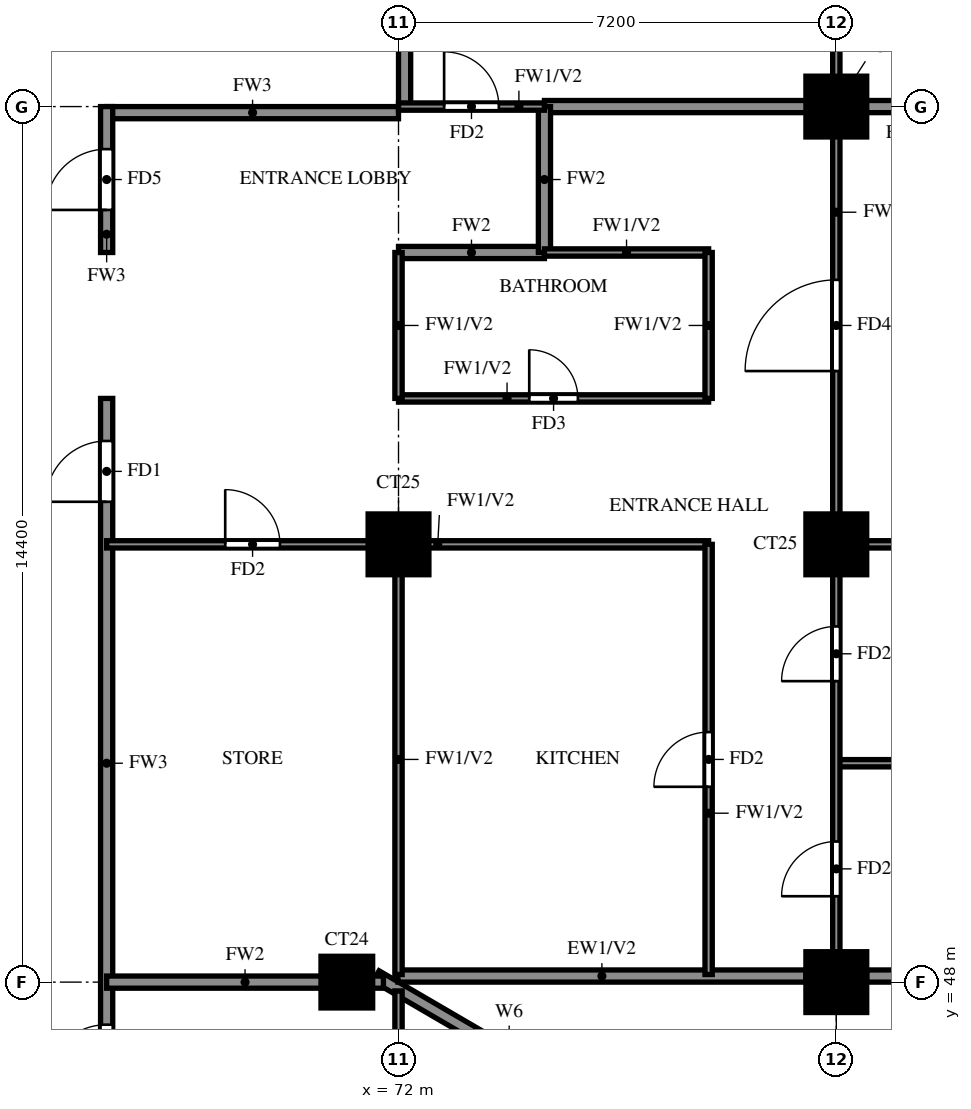
"""IFC4 building model, lengths in metres.
Left out: names, types, materials, properties, quantities, classifications, styles, units other than length and angle.
Written with IfcOpenShell. Run it as: python <this file> out.ifc"""

import sys

from ifc_helpers import new_model, si_unit, direction, frame, frame_2d, origin, origin_2d, place, context, subcontext, project, spatial, rectangle, extrude, source, transform, mapped, element, fill, save


model = new_model("IFC4")
c1 = context("Model", 3, precision=1e-05, world=origin(), true_north=direction((0.0, 1.0)))
c2 = subcontext(c1, "Body", "Model", "MODEL_VIEW")
j1 = project(units=[si_unit("LENGTHUNIT", "METRE"), si_unit("PLANEANGLEUNIT", "RADIAN")], contexts=[c1])
p1 = place(None, origin())
s1 = spatial("IfcSite", under=j1, at=p1, CompositionType="ELEMENT")
p2 = place(p1, origin())
s2 = spatial("IfcBuilding", under=s1, at=p2, CompositionType="ELEMENT")
p3 = place(p2, frame((0.0, 0.0, 157.0)))
s3 = spatial("IfcBuildingStorey", under=s2, at=p3, CompositionType="ELEMENT", Elevation=157.0)
m1 = source(origin(), c2, "Body", "SweptSolid", [
    extrude(rectangle(XDim=0.85, YDim=0.85, at=origin_2d()), origin(), (0.0, 0.0, 1.0), 3.2),
])
p4 = place(p3, frame((71.15, 48.0, 0.0), z_axis=(0.0, 0.0, 1.0), x_axis=(1.0, 0.0, 0.0)))
e1 = element("IfcColumn", 1, at=p4, inside=s3, PredefinedType="COLUMN", context=c2, shape_type="MappedRepresentation", body=[
    mapped(m1, transform((0.0, 0.0, 0.0))),
])
m2 = source(origin(), c2, "Body", "SweptSolid", [
    extrude(rectangle(XDim=1.0, YDim=1.0, at=origin_2d()), origin(), (0.0, 0.0, 1.0), 3.2),
])
for number, where, z_axis, x_axis in (
    (2, (79.2, 48.0, 0.0), (0.0, 0.0, 1.0), (1.0, 0.0, 0.0)),
    (3, (72.0, 55.2, 0.0), (0.0, 0.0, 1.0), (1.0, 0.0, 0.0)),
    (4, (79.2, 55.2, 0.0), (0.0, 0.0, 1.0), (1.0, 0.0, 0.0)),
    (5, (79.2, 62.4, 0.0), (0.0, 0.0, 1.0), (1.0, 0.0, 0.0)),
):
    element("IfcColumn", number, at=place(p3, frame(where, z_axis=z_axis, x_axis=x_axis)), inside=s3, PredefinedType="COLUMN", context=c2, shape_type="MappedRepresentation", body=[
        mapped(m2, transform((0.0, 0.0, 0.0))),
    ])
p5 = place(p3, frame((85.719, 39.881, 0.0), z_axis=(0.0, 0.0, 1.0), x_axis=(-0.86377618652, 0.503875678716, 0.0)))
e6 = element("IfcWall", 6, at=p5, inside=s3, PredefinedType="SOLIDWALL", context=c2, shape_type="SweptSolid", body=[
    extrude(rectangle(XDim=16.311, YDim=0.2, at=frame_2d((8.156, 0.0))), origin(), (0.0, 0.0, 1.0), 3.2),
])
p6 = place(p5, frame((13.326, 0.0, 1.5)))
e7 = element("IfcOpeningElement", 7, at=p6, cuts=e6, PredefinedType="OPENING", context=c2, shape_type="SweptSolid", body=[
    extrude(rectangle(XDim=0.9, YDim=0.9, at=frame_2d((0.45, 0.45))), frame((0.0, 0.11, 0.0), z_axis=(0.0, -1.0, 0.0), x_axis=(1.0, 0.0, 0.0)), (0.0, 0.0, 1.0), 0.22),
])
p7 = place(p3, frame((71.99, 48.1, 0.0), z_axis=(0.0, 0.0, 1.0), x_axis=(1.0, 0.0, 0.0)))
e8 = element("IfcWall", 8, at=p7, inside=s3, PredefinedType="SOLIDWALL", context=c2, shape_type="SweptSolid", body=[
    extrude(rectangle(XDim=6.71, YDim=0.2, at=frame_2d((3.355, 0.0))), origin(), (0.0, 0.0, 1.0), 3.2),
])
p8 = place(p3, frame((79.7, 48.1, 0.0), z_axis=(0.0, 0.0, 1.0), x_axis=(1.0, 0.0, 0.0)))
e9 = element("IfcWall", 9, at=p8, inside=s3, PredefinedType="SOLIDWALL", context=c2, shape_type="SweptSolid", body=[
    extrude(rectangle(XDim=5.675, YDim=0.2, at=frame_2d((2.837, 0.0))), origin(), (0.0, 0.0, 1.0), 3.2),
])
p9 = place(p8, frame((1.637, 0.0, 0.6)))
e10 = element("IfcOpeningElement", 10, at=p9, cuts=e9, PredefinedType="OPENING", context=c2, shape_type="SweptSolid", body=[
    extrude(rectangle(XDim=2.4, YDim=2.4, at=frame_2d((1.2, 1.2))), frame((0.0, 0.11, 0.0), z_axis=(0.0, -1.0, 0.0), x_axis=(1.0, 0.0, 0.0)), (0.0, 0.0, 1.0), 0.22),
])
p10 = place(p3, frame((67.2, 62.3, 0.0), z_axis=(0.0, 0.0, 1.0), x_axis=(1.0, 0.0, 0.0)))
e11 = element("IfcWall", 11, at=p10, inside=s3, PredefinedType="SOLIDWALL", context=c2, shape_type="SweptSolid", body=[
    extrude(rectangle(XDim=4.8, YDim=0.2, at=frame_2d((2.4, 0.0))), origin(), (0.0, 0.0, 1.0), 3.2),
])
p11 = place(p3, frame((67.2, 45.6, 0.0), z_axis=(0.0, 0.0, 1.0), x_axis=(0.0, 1.0, 0.0)))
e12 = element("IfcWall", 12, at=p11, inside=s3, PredefinedType="SOLIDWALL", context=c2, shape_type="SweptSolid", body=[
    extrude(rectangle(XDim=12.0, YDim=0.2, at=frame_2d((6.0, 0.0))), origin(), (0.0, 0.0, 1.0), 3.2),
])
p12 = place(p11, frame((10.3, 0.0, 0.0)))
e13 = element("IfcOpeningElement", 13, at=p12, cuts=e12, PredefinedType="OPENING", context=c2, shape_type="SweptSolid", body=[
    extrude(rectangle(XDim=1.0, YDim=2.1, at=frame_2d((0.5, 1.05))), frame((0.0, 0.11, 0.0), z_axis=(0.0, -1.0, 0.0), x_axis=(1.0, 0.0, 0.0)), (0.0, 0.0, 1.0), 0.22),
])
p13 = place(p11, frame((0.7, 0.0, 0.0)))
e14 = element("IfcOpeningElement", 14, at=p13, cuts=e12, PredefinedType="OPENING", context=c2, shape_type="SweptSolid", body=[
    extrude(rectangle(XDim=1.0, YDim=2.1, at=frame_2d((0.5, 1.05))), frame((0.0, 0.11, 0.0), z_axis=(0.0, -1.0, 0.0), x_axis=(1.0, 0.0, 0.0)), (0.0, 0.0, 1.0), 0.22),
])
p14 = place(p3, frame((67.2, 60.0, 0.0), z_axis=(0.0, 0.0, 1.0), x_axis=(0.0, 1.0, 0.0)))
e15 = element("IfcWall", 15, at=p14, inside=s3, PredefinedType="SOLIDWALL", context=c2, shape_type="SweptSolid", body=[
    extrude(rectangle(XDim=2.4, YDim=0.2, at=frame_2d((1.2, 0.0))), origin(), (0.0, 0.0, 1.0), 3.2),
])
p15 = place(p14, frame((0.7, 0.0, 0.0)))
e16 = element("IfcOpeningElement", 16, at=p15, cuts=e15, PredefinedType="OPENING", context=c2, shape_type="SweptSolid", body=[
    extrude(rectangle(XDim=1.0, YDim=2.1, at=frame_2d((0.5, 1.05))), frame((0.0, 0.11, 0.0), z_axis=(0.0, -1.0, 0.0), x_axis=(1.0, 0.0, 0.0)), (0.0, 0.0, 1.0), 0.22),
])
p16 = place(p3, frame((72.1, 62.4, 0.0), z_axis=(0.0, 0.0, 1.0), x_axis=(0.0, 1.0, 0.0)))
e17 = element("IfcWall", 17, at=p16, inside=s3, PredefinedType="SOLIDWALL", context=c2, shape_type="SweptSolid", body=[
    extrude(rectangle(XDim=15.6, YDim=0.2, at=frame_2d((7.8, 0.0))), origin(), (0.0, 0.0, 1.0), 3.2),
])
p17 = place(p3, frame((67.2, 48.0, 0.0), z_axis=(0.0, 0.0, 1.0), x_axis=(1.0, 0.0, 0.0)))
e18 = element("IfcWall", 18, at=p17, inside=s3, PredefinedType="SOLIDWALL", context=c2, shape_type="SweptSolid", body=[
    extrude(rectangle(XDim=4.552, YDim=0.2, at=frame_2d((2.276, 0.0))), origin(), (0.0, 0.0, 1.0), 3.2),
])
p18 = place(p3, frame((72.0, 60.0, 0.0), z_axis=(0.0, 0.0, 1.0), x_axis=(1.0, 0.0, 0.0)))
e19 = element("IfcWall", 19, at=p18, inside=s3, PredefinedType="SOLIDWALL", context=c2, shape_type="SweptSolid", body=[
    extrude(rectangle(XDim=2.4, YDim=0.2, at=frame_2d((1.2, 0.0))), origin(), (0.0, 0.0, 1.0), 3.2),
])
p19 = place(p3, frame((74.4, 62.4, 0.0), z_axis=(0.0, 0.0, 1.0), x_axis=(1.0, 0.0, 0.0)))
e20 = element("IfcWall", 20, at=p19, inside=s3, PredefinedType="SOLIDWALL", context=c2, shape_type="SweptSolid", body=[
    extrude(rectangle(XDim=11.875, YDim=0.2, at=frame_2d((5.938, 0.0))), origin(), (0.0, 0.0, 1.0), 3.2),
])
p20 = place(p3, frame((74.4, 60.0, 0.0), z_axis=(0.0, 0.0, 1.0), x_axis=(0.0, 1.0, 0.0)))
e21 = element("IfcWall", 21, at=p20, inside=s3, PredefinedType="SOLIDWALL", context=c2, shape_type="SweptSolid", body=[
    extrude(rectangle(XDim=2.4, YDim=0.2, at=frame_2d((1.2, 0.0))), origin(), (0.0, 0.0, 1.0), 3.2),
])
p21 = place(p3, frame((79.2, 51.6, 0.0), z_axis=(0.0, 0.0, 1.0), x_axis=(1.0, 0.0, 0.0)))
e22 = element("IfcWall", 22, at=p21, inside=s3, PredefinedType="PARTITIONING", context=c2, shape_type="SweptSolid", body=[
    extrude(rectangle(XDim=7.075, YDim=0.12, at=frame_2d((3.538, 0.0))), origin(), (0.0, 0.0, 1.0), 2.3),
])
p22 = place(p3, frame((67.2, 55.2, 0.0), z_axis=(0.0, 0.0, 1.0), x_axis=(1.0, 0.0, 0.0)))
e23 = element("IfcWall", 23, at=p22, inside=s3, PredefinedType="PARTITIONING", context=c2, shape_type="SweptSolid", body=[
    extrude(rectangle(XDim=9.9, YDim=0.12, at=frame_2d((4.95, 0.0))), origin(), (0.0, 0.0, 1.0), 3.2),
])
p23 = place(p22, frame((1.95, 0.0, 0.0)))
e24 = element("IfcOpeningElement", 24, at=p23, cuts=e23, PredefinedType="OPENING", context=c2, shape_type="SweptSolid", body=[
    extrude(rectangle(XDim=0.9, YDim=2.1, at=frame_2d((0.45, 1.05))), frame((0.0, 0.07, 0.0), z_axis=(0.0, -1.0, 0.0), x_axis=(1.0, 0.0, 0.0)), (0.0, 0.0, 1.0), 0.14),
])
p24 = place(p3, frame((79.2, 55.2, 0.0), z_axis=(0.0, 0.0, 1.0), x_axis=(1.0, 0.0, 0.0)))
e25 = element("IfcWall", 25, at=p24, inside=s3, PredefinedType="PARTITIONING", context=c2, shape_type="SweptSolid", body=[
    extrude(rectangle(XDim=7.075, YDim=0.12, at=frame_2d((3.538, 0.0))), origin(), (0.0, 0.0, 1.0), 3.2),
])
p25 = place(p3, frame((72.0, 57.6, 0.0), z_axis=(0.0, 0.0, 1.0), x_axis=(1.0, 0.0, 0.0)))
e26 = element("IfcWall", 26, at=p25, inside=s3, PredefinedType="PARTITIONING", context=c2, shape_type="SweptSolid", body=[
    extrude(rectangle(XDim=5.1, YDim=0.12, at=frame_2d((2.55, 0.0))), origin(), (0.0, 0.0, 1.0), 3.2),
])
p26 = place(p25, frame((2.15, 0.0, 0.0)))
e27 = element("IfcOpeningElement", 27, at=p26, cuts=e26, PredefinedType="OPENING", context=c2, shape_type="SweptSolid", body=[
    extrude(rectangle(XDim=0.8, YDim=2.1, at=frame_2d((0.4, 1.05))), frame((0.0, 0.07, 0.0), z_axis=(0.0, -1.0, 0.0), x_axis=(1.0, 0.0, 0.0)), (0.0, 0.0, 1.0), 0.14),
])
p27 = place(p3, frame((74.4, 60.0, 0.0), z_axis=(0.0, 0.0, 1.0), x_axis=(1.0, 0.0, 0.0)))
e28 = element("IfcWall", 28, at=p27, inside=s3, PredefinedType="PARTITIONING", context=c2, shape_type="SweptSolid", body=[
    extrude(rectangle(XDim=2.7, YDim=0.12, at=frame_2d((1.35, 0.0))), origin(), (0.0, 0.0, 1.0), 3.2),
])
p28 = place(p3, frame((72.0, 62.4, 0.0), z_axis=(0.0, 0.0, 1.0), x_axis=(1.0, 0.0, 0.0)))
e29 = element("IfcWall", 29, at=p28, inside=s3, PredefinedType="PARTITIONING", context=c2, shape_type="SweptSolid", body=[
    extrude(rectangle(XDim=2.4, YDim=0.12, at=frame_2d((1.2, 0.0))), origin(), (0.0, 0.0, 1.0), 3.2),
])
p29 = place(p28, frame((0.75, 0.0, 0.0)))
e30 = element("IfcOpeningElement", 30, at=p29, cuts=e29, PredefinedType="OPENING", context=c2, shape_type="SweptSolid", body=[
    extrude(rectangle(XDim=0.9, YDim=2.1, at=frame_2d((0.45, 1.05))), frame((0.0, 0.07, 0.0), z_axis=(0.0, -1.0, 0.0), x_axis=(1.0, 0.0, 0.0)), (0.0, 0.0, 1.0), 0.14),
])
p30 = place(p3, frame((72.0, 39.725, 0.0), z_axis=(0.0, 0.0, 1.0), x_axis=(0.0, 1.0, 0.0)))
e31 = element("IfcWall", 31, at=p30, inside=s3, PredefinedType="PARTITIONING", context=c2, shape_type="SweptSolid", body=[
    extrude(rectangle(XDim=8.13, YDim=0.12, at=frame_2d((4.065, 0.0))), origin(), (0.0, 0.0, 1.0), 2.3),
])
p31 = place(p30, frame((1.788, 0.0, 0.0)))
e32 = element("IfcOpeningElement", 32, at=p31, cuts=e31, PredefinedType="OPENING", context=c2, shape_type="SweptSolid", body=[
    extrude(rectangle(XDim=0.9, YDim=2.1, at=frame_2d((0.45, 1.05))), frame((0.0, 0.07, 0.0), z_axis=(0.0, -1.0, 0.0), x_axis=(1.0, 0.0, 0.0)), (0.0, 0.0, 1.0), 0.14),
])
p32 = place(p30, frame((4.575, 0.0, 0.0)))
e33 = element("IfcOpeningElement", 33, at=p32, cuts=e31, PredefinedType="OPENING", context=c2, shape_type="SweptSolid", body=[
    extrude(rectangle(XDim=0.8, YDim=2.1, at=frame_2d((0.4, 1.05))), frame((0.0, 0.07, 0.0), z_axis=(0.0, -1.0, 0.0), x_axis=(1.0, 0.0, 0.0)), (0.0, 0.0, 1.0), 0.14),
])
p33 = place(p3, frame((72.0, 48.125, 0.0), z_axis=(0.0, 0.0, 1.0), x_axis=(0.0, 1.0, 0.0)))
e34 = element("IfcWall", 34, at=p33, inside=s3, PredefinedType="PARTITIONING", context=c2, shape_type="SweptSolid", body=[
    extrude(rectangle(XDim=7.075, YDim=0.12, at=frame_2d((3.538, 0.0))), origin(), (0.0, 0.0, 1.0), 3.2),
])
p34 = place(p3, frame((72.0, 57.6, 0.0), z_axis=(0.0, 0.0, 1.0), x_axis=(0.0, 1.0, 0.0)))
e35 = element("IfcWall", 35, at=p34, inside=s3, PredefinedType="PARTITIONING", context=c2, shape_type="SweptSolid", body=[
    extrude(rectangle(XDim=2.4, YDim=0.12, at=frame_2d((1.2, 0.0))), origin(), (0.0, 0.0, 1.0), 3.2),
])
p35 = place(p3, frame((77.1, 48.125, 0.0), z_axis=(0.0, 0.0, 1.0), x_axis=(0.0, 1.0, 0.0)))
e36 = element("IfcWall", 36, at=p35, inside=s3, PredefinedType="PARTITIONING", context=c2, shape_type="SweptSolid", body=[
    extrude(rectangle(XDim=7.075, YDim=0.12, at=frame_2d((3.538, 0.0))), origin(), (0.0, 0.0, 1.0), 3.2),
])
p36 = place(p35, frame((3.087, 0.0, 0.0)))
e37 = element("IfcOpeningElement", 37, at=p36, cuts=e36, PredefinedType="OPENING", context=c2, shape_type="SweptSolid", body=[
    extrude(rectangle(XDim=0.9, YDim=2.1, at=frame_2d((0.45, 1.05))), frame((0.0, 0.07, 0.0), z_axis=(0.0, -1.0, 0.0), x_axis=(1.0, 0.0, 0.0)), (0.0, 0.0, 1.0), 0.14),
])
p37 = place(p3, frame((77.1, 57.6, 0.0), z_axis=(0.0, 0.0, 1.0), x_axis=(0.0, 1.0, 0.0)))
e38 = element("IfcWall", 38, at=p37, inside=s3, PredefinedType="PARTITIONING", context=c2, shape_type="SweptSolid", body=[
    extrude(rectangle(XDim=2.4, YDim=0.12, at=frame_2d((1.2, 0.0))), origin(), (0.0, 0.0, 1.0), 3.2),
])
p38 = place(p3, frame((79.2, 48.125, 0.0), z_axis=(0.0, 0.0, 1.0), x_axis=(0.0, 1.0, 0.0)))
e39 = element("IfcWall", 39, at=p38, inside=s3, PredefinedType="PARTITIONING", context=c2, shape_type="SweptSolid", body=[
    extrude(rectangle(XDim=25.075, YDim=0.12, at=frame_2d((12.538, 0.0))), origin(), (0.0, 0.0, 1.0), 3.2),
])
p39 = place(p38, frame((1.288, 0.0, 0.0)))
e40 = element("IfcOpeningElement", 40, at=p39, cuts=e39, PredefinedType="OPENING", context=c2, shape_type="SweptSolid", body=[
    extrude(rectangle(XDim=0.9, YDim=2.1, at=frame_2d((0.45, 1.05))), frame((0.0, 0.07, 0.0), z_axis=(0.0, -1.0, 0.0), x_axis=(1.0, 0.0, 0.0)), (0.0, 0.0, 1.0), 0.14),
])
p40 = place(p38, frame((4.825, 0.0, 0.0)))
e41 = element("IfcOpeningElement", 41, at=p40, cuts=e39, PredefinedType="OPENING", context=c2, shape_type="SweptSolid", body=[
    extrude(rectangle(XDim=0.9, YDim=2.1, at=frame_2d((0.45, 1.05))), frame((0.0, 0.07, 0.0), z_axis=(0.0, -1.0, 0.0), x_axis=(1.0, 0.0, 0.0)), (0.0, 0.0, 1.0), 0.14),
])
p41 = place(p38, frame((9.925, 0.0, 0.0)))
e42 = element("IfcOpeningElement", 42, at=p41, cuts=e39, PredefinedType="OPENING", context=c2, shape_type="SweptSolid", body=[
    extrude(rectangle(XDim=1.5, YDim=2.1, at=frame_2d((0.75, 1.05))), frame((0.0, 0.07, 0.0), z_axis=(0.0, -1.0, 0.0), x_axis=(1.0, 0.0, 0.0)), (0.0, 0.0, 1.0), 0.14),
])
p42 = place(p38, frame((15.625, 0.0, 0.0)))
e43 = element("IfcOpeningElement", 43, at=p42, cuts=e39, PredefinedType="OPENING", context=c2, shape_type="SweptSolid", body=[
    extrude(rectangle(XDim=0.9, YDim=2.1, at=frame_2d((0.45, 1.05))), frame((0.0, 0.07, 0.0), z_axis=(0.0, -1.0, 0.0), x_axis=(1.0, 0.0, 0.0)), (0.0, 0.0, 1.0), 0.14),
])
p43 = place(p38, frame((19.225, 0.0, 0.0)))
e44 = element("IfcOpeningElement", 44, at=p43, cuts=e39, PredefinedType="OPENING", context=c2, shape_type="SweptSolid", body=[
    extrude(rectangle(XDim=0.9, YDim=2.1, at=frame_2d((0.45, 1.05))), frame((0.0, 0.07, 0.0), z_axis=(0.0, -1.0, 0.0), x_axis=(1.0, 0.0, 0.0)), (0.0, 0.0, 1.0), 0.14),
])
p44 = place(p38, frame((22.825, 0.0, 0.0)))
e45 = element("IfcOpeningElement", 45, at=p44, cuts=e39, PredefinedType="OPENING", context=c2, shape_type="SweptSolid", body=[
    extrude(rectangle(XDim=0.9, YDim=2.1, at=frame_2d((0.45, 1.05))), frame((0.0, 0.07, 0.0), z_axis=(0.0, -1.0, 0.0), x_axis=(1.0, 0.0, 0.0)), (0.0, 0.0, 1.0), 0.14),
])
p45 = place(p12, origin())
e46 = element("IfcDoor", 46, at=p45, inside=s3, OperationType="SINGLE_SWING_RIGHT", PredefinedType="DOOR", context=c2, shape_type="SweptSolid", body=[
    extrude(rectangle(XDim=1.0, YDim=2.1, at=frame_2d((0.5, 1.05))), frame((0.0, 0.025, 0.0), z_axis=(0.0, -1.0, 0.0), x_axis=(1.0, 0.0, 0.0)), (0.0, 0.0, 1.0), 0.05),
])
fill(e13, e46)
p46 = place(p39, origin())
e47 = element("IfcDoor", 47, at=p46, inside=s3, OperationType="SINGLE_SWING_LEFT", PredefinedType="DOOR", context=c2, shape_type="SweptSolid", body=[
    extrude(rectangle(XDim=0.9, YDim=2.1, at=frame_2d((0.45, 1.05))), frame((0.0, 0.025, 0.0), z_axis=(0.0, -1.0, 0.0), x_axis=(1.0, 0.0, 0.0)), (0.0, 0.0, 1.0), 0.05),
])
fill(e40, e47)
p47 = place(p40, origin())
e48 = element("IfcDoor", 48, at=p47, inside=s3, OperationType="SINGLE_SWING_LEFT", PredefinedType="DOOR", context=c2, shape_type="SweptSolid", body=[
    extrude(rectangle(XDim=0.9, YDim=2.1, at=frame_2d((0.45, 1.05))), frame((0.0, 0.025, 0.0), z_axis=(0.0, -1.0, 0.0), x_axis=(1.0, 0.0, 0.0)), (0.0, 0.0, 1.0), 0.05),
])
fill(e41, e48)
p48 = place(p41, origin())
e49 = element("IfcDoor", 49, at=p48, inside=s3, OperationType="SINGLE_SWING_RIGHT", PredefinedType="DOOR", context=c2, shape_type="SweptSolid", body=[
    extrude(rectangle(XDim=1.5, YDim=2.1, at=frame_2d((0.75, 1.05))), frame((0.0, 0.025, 0.0), z_axis=(0.0, -1.0, 0.0), x_axis=(1.0, 0.0, 0.0)), (0.0, 0.0, 1.0), 0.05),
])
fill(e42, e49)
p49 = place(p36, origin())
e50 = element("IfcDoor", 50, at=p49, inside=s3, OperationType="SINGLE_SWING_LEFT", PredefinedType="DOOR", context=c2, shape_type="SweptSolid", body=[
    extrude(rectangle(XDim=0.9, YDim=2.1, at=frame_2d((0.45, 1.05))), frame((0.0, 0.025, 0.0), z_axis=(0.0, -1.0, 0.0), x_axis=(1.0, 0.0, 0.0)), (0.0, 0.0, 1.0), 0.05),
])
fill(e37, e50)
p50 = place(p26, origin())
e51 = element("IfcDoor", 51, at=p50, inside=s3, OperationType="SINGLE_SWING_LEFT", PredefinedType="DOOR", context=c2, shape_type="SweptSolid", body=[
    extrude(rectangle(XDim=0.8, YDim=2.1, at=frame_2d((0.4, 1.05))), frame((0.0, 0.025, 0.0), z_axis=(0.0, -1.0, 0.0), x_axis=(1.0, 0.0, 0.0)), (0.0, 0.0, 1.0), 0.05),
])
fill(e27, e51)
p51 = place(p23, origin())
e52 = element("IfcDoor", 52, at=p51, inside=s3, OperationType="SINGLE_SWING_RIGHT", PredefinedType="DOOR", context=c2, shape_type="SweptSolid", body=[
    extrude(rectangle(XDim=0.9, YDim=2.1, at=frame_2d((0.45, 1.05))), frame((0.0, 0.025, 0.0), z_axis=(0.0, -1.0, 0.0), x_axis=(1.0, 0.0, 0.0)), (0.0, 0.0, 1.0), 0.05),
])
fill(e24, e52)
p52 = place(p29, origin())
e53 = element("IfcDoor", 53, at=p52, inside=s3, OperationType="SINGLE_SWING_LEFT", PredefinedType="DOOR", context=c2, shape_type="SweptSolid", body=[
    extrude(rectangle(XDim=0.9, YDim=2.1, at=frame_2d((0.45, 1.05))), frame((0.0, 0.025, 0.0), z_axis=(0.0, -1.0, 0.0), x_axis=(1.0, 0.0, 0.0)), (0.0, 0.0, 1.0), 0.05),
])
fill(e30, e53)
p53 = place(p15, origin())
e54 = element("IfcDoor", 54, at=p53, inside=s3, OperationType="SINGLE_SWING_RIGHT", PredefinedType="DOOR", context=c2, shape_type="SweptSolid", body=[
    extrude(rectangle(XDim=1.0, YDim=2.1, at=frame_2d((0.5, 1.05))), frame((0.0, 0.025, 0.0), z_axis=(0.0, -1.0, 0.0), x_axis=(1.0, 0.0, 0.0)), (0.0, 0.0, 1.0), 0.05),
])
fill(e16, e54)
p54 = place(p13, origin())
e55 = element("IfcDoor", 55, at=p54, inside=s3, OperationType="SINGLE_SWING_RIGHT", PredefinedType="DOOR", context=c2, shape_type="SweptSolid", body=[
    extrude(rectangle(XDim=1.0, YDim=2.1, at=frame_2d((0.5, 1.05))), frame((0.0, 0.025, 0.0), z_axis=(0.0, -1.0, 0.0), x_axis=(1.0, 0.0, 0.0)), (0.0, 0.0, 1.0), 0.05),
])
fill(e14, e55)
save(model, sys.argv[1])
